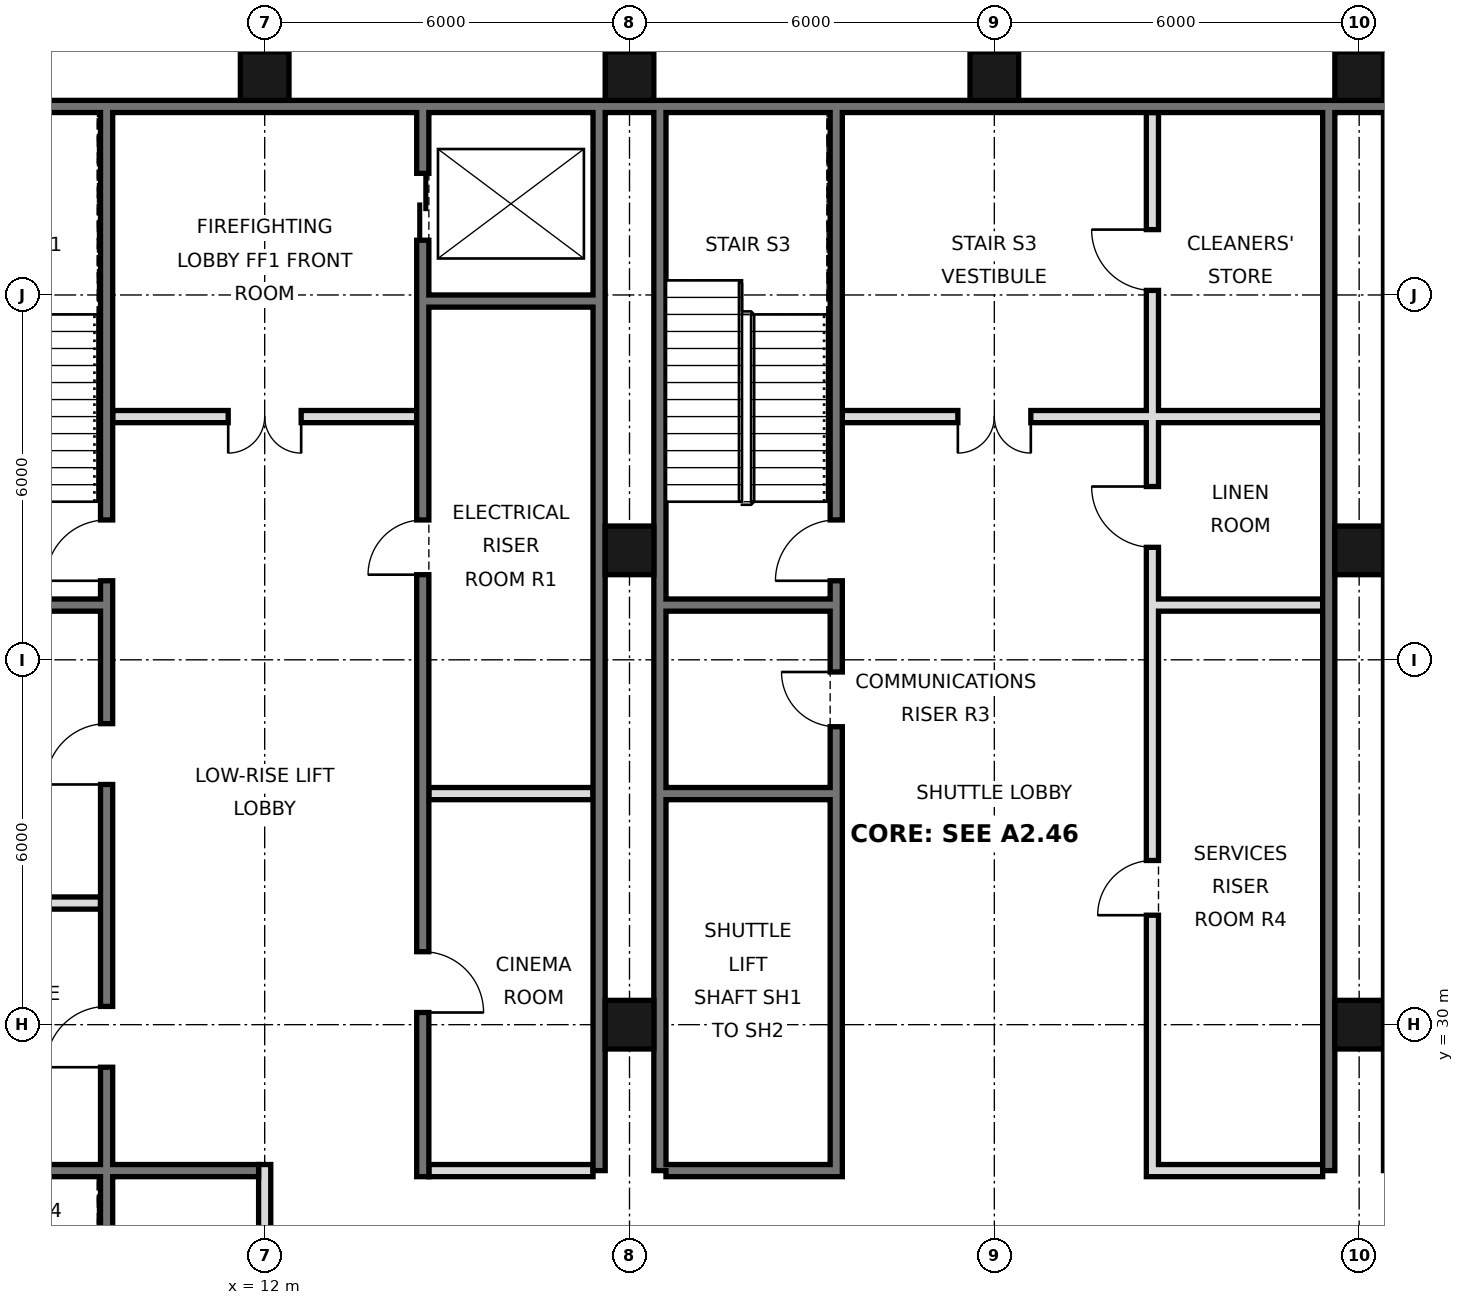
"""IFC4 building model, lengths in metres.
Left out: names, types, materials, properties, quantities, classifications, styles, units other than length and angle.
Written with IfcOpenShell. Run it as: python <this file> out.ifc"""

import sys

from ifc_helpers import new_model, si_unit, direction, frame, frame_2d, origin, origin_2d, place, context, subcontext, project, spatial, rectangle, hollow_rectangle, extrude, element, fill, save


model = new_model("IFC4")
c1 = context("Model", 3, precision=1e-05, world=origin(), true_north=direction((0.0, 1.0)))
c2 = subcontext(c1, "Body", "Model", "MODEL_VIEW")
j1 = project(units=[si_unit("LENGTHUNIT", "METRE"), si_unit("PLANEANGLEUNIT", "RADIAN")], contexts=[c1])
p1 = place(None, origin())
s1 = spatial("IfcSite", under=j1, at=p1, CompositionType="ELEMENT")
p2 = place(p1, origin())
s2 = spatial("IfcBuilding", under=s1, at=p2, CompositionType="ELEMENT")
p3 = place(p2, frame((0.0, 0.0, 181.6)))
s3 = spatial("IfcBuildingStorey", under=s2, at=p3, CompositionType="ELEMENT", Elevation=181.6)
for number, where, z_axis, x_axis in (
    (1, (12.0, 45.6, 0.0), (0.0, 0.0, 1.0), (1.0, 0.0, 0.0)),
    (2, (18.0, 30.0, 0.0), (0.0, 0.0, 1.0), (1.0, 0.0, 0.0)),
    (3, (18.0, 37.8, 0.0), (0.0, 0.0, 1.0), (1.0, 0.0, 0.0)),
    (4, (18.0, 45.6, 0.0), (0.0, 0.0, 1.0), (1.0, 0.0, 0.0)),
    (5, (24.0, 45.6, 0.0), (0.0, 0.0, 1.0), (1.0, 0.0, 0.0)),
    (6, (30.0, 30.0, 0.0), (0.0, 0.0, 1.0), (1.0, 0.0, 0.0)),
    (7, (30.0, 37.8, 0.0), (0.0, 0.0, 1.0), (1.0, 0.0, 0.0)),
    (8, (30.0, 45.6, 0.0), (0.0, 0.0, 1.0), (1.0, 0.0, 0.0)),
):
    element("IfcColumn", number, at=place(p3, frame(where, z_axis=z_axis, x_axis=x_axis)), inside=s3, PredefinedType="COLUMN", context=c2, shape_type="SweptSolid", body=[
        extrude(hollow_rectangle(XDim=0.8, YDim=0.8, WallThickness=0.045, at=origin_2d()), origin(), (0.0, 0.0, 1.0), 4.4),
    ])
p4 = place(p3, frame((6.6, 45.1, 0.0), z_axis=(0.0, 0.0, 1.0), x_axis=(1.0, 0.0, 0.0)))
e9 = element("IfcWall", 9, at=p4, inside=s3, PredefinedType="SOLIDWALL", context=c2, shape_type="SweptSolid", body=[
    extrude(rectangle(XDim=34.8, YDim=0.2, at=frame_2d((17.4, 0.0))), origin(), (0.0, 0.0, 1.0), 4.1),
])
for number, where, z_axis, x_axis in (
    (10, (17.5, 27.6, 0.0), (0.0, 0.0, 1.0), (0.0, 1.0, 0.0)),
    (11, (18.5, 27.6, 0.0), (0.0, 0.0, 1.0), (0.0, 1.0, 0.0)),
    (12, (29.5, 27.6, 0.0), (0.0, 0.0, 1.0), (0.0, 1.0, 0.0)),
):
    element("IfcWall", number, at=place(p3, frame(where, z_axis=z_axis, x_axis=x_axis)), inside=s3, PredefinedType="SOLIDWALL", context=c2, shape_type="SweptSolid", body=[
        extrude(rectangle(XDim=17.5, YDim=0.2, at=frame_2d((8.75, 0.0))), origin(), (0.0, 0.0, 1.0), 4.1),
    ])
p5 = place(p3, frame((12.0, 21.6, 0.0), z_axis=(0.0, 0.0, 1.0), x_axis=(0.0, 1.0, 0.0)))
e13 = element("IfcWall", 13, at=p5, inside=s3, PredefinedType="PARTITIONING", context=c2, shape_type="SweptSolid", body=[
    extrude(rectangle(XDim=6.1, YDim=0.2, at=frame_2d((3.05, 0.0))), origin(), (0.0, 0.0, 1.0), 4.1),
])
p6 = place(p3, frame((14.6, 27.5, 0.0), z_axis=(0.0, 0.0, 1.0), x_axis=(0.0, 1.0, 0.0)))
e14 = element("IfcWall", 14, at=p6, inside=s3, PredefinedType="SOLIDWALL", context=c2, shape_type="SweptSolid", body=[
    extrude(rectangle(XDim=17.5, YDim=0.2, at=frame_2d((8.75, 0.0))), origin(), (0.0, 0.0, 1.0), 4.1),
])
p7 = place(p6, frame((15.4, 0.0, 0.0)))
e15 = element("IfcOpeningElement", 15, at=p7, cuts=e14, PredefinedType="OPENING", context=c2, shape_type="SweptSolid", body=[
    extrude(rectangle(XDim=1.1, YDim=2.1, at=frame_2d((0.55, 1.05))), frame((0.0, 0.11, 0.0), z_axis=(0.0, -1.0, 0.0), x_axis=(1.0, 0.0, 0.0)), (0.0, 0.0, 1.0), 0.22),
])
p8 = place(p6, frame((2.7, 0.0, 0.0)))
e16 = element("IfcOpeningElement", 16, at=p8, cuts=e14, PredefinedType="OPENING", context=c2, shape_type="SweptSolid", body=[
    extrude(rectangle(XDim=1.0, YDim=2.1, at=frame_2d((0.5, 1.05))), frame((0.0, 0.11, 0.0), z_axis=(0.0, -1.0, 0.0), x_axis=(1.0, 0.0, 0.0)), (0.0, 0.0, 1.0), 0.22),
])
p9 = place(p6, frame((9.9, 0.0, 0.0)))
e17 = element("IfcOpeningElement", 17, at=p9, cuts=e14, PredefinedType="OPENING", context=c2, shape_type="SweptSolid", body=[
    extrude(rectangle(XDim=0.9, YDim=2.1, at=frame_2d((0.45, 1.05))), frame((0.0, 0.11, 0.0), z_axis=(0.0, -1.0, 0.0), x_axis=(1.0, 0.0, 0.0)), (0.0, 0.0, 1.0), 0.22),
])
p10 = place(p3, frame((21.4, 27.5, 0.0), z_axis=(0.0, 0.0, 1.0), x_axis=(0.0, 1.0, 0.0)))
e18 = element("IfcWall", 18, at=p10, inside=s3, PredefinedType="SOLIDWALL", context=c2, shape_type="SweptSolid", body=[
    extrude(rectangle(XDim=17.5, YDim=0.2, at=frame_2d((8.75, 0.0))), origin(), (0.0, 0.0, 1.0), 4.1),
])
p11 = place(p10, frame((9.8, 0.0, 0.0)))
e19 = element("IfcOpeningElement", 19, at=p11, cuts=e18, PredefinedType="OPENING", context=c2, shape_type="SweptSolid", body=[
    extrude(rectangle(XDim=1.0, YDim=2.1, at=frame_2d((0.5, 1.05))), frame((0.0, 0.11, 0.0), z_axis=(0.0, -1.0, 0.0), x_axis=(1.0, 0.0, 0.0)), (0.0, 0.0, 1.0), 0.22),
])
p12 = place(p10, frame((7.4, 0.0, 0.0)))
e20 = element("IfcOpeningElement", 20, at=p12, cuts=e18, PredefinedType="OPENING", context=c2, shape_type="SweptSolid", body=[
    extrude(rectangle(XDim=0.9, YDim=2.1, at=frame_2d((0.45, 1.05))), frame((0.0, 0.11, 0.0), z_axis=(0.0, -1.0, 0.0), x_axis=(1.0, 0.0, 0.0)), (0.0, 0.0, 1.0), 0.22),
])
p13 = place(p3, frame((26.6, 27.5, 0.0), z_axis=(0.0, 0.0, 1.0), x_axis=(0.0, 1.0, 0.0)))
e21 = element("IfcWall", 21, at=p13, inside=s3, PredefinedType="SOLIDWALL", context=c2, shape_type="SweptSolid", body=[
    extrude(rectangle(XDim=17.5, YDim=0.2, at=frame_2d((8.75, 0.0))), origin(), (0.0, 0.0, 1.0), 4.1),
])
p14 = place(p13, frame((4.3, 0.0, 0.0)))
e22 = element("IfcOpeningElement", 22, at=p14, cuts=e21, PredefinedType="OPENING", context=c2, shape_type="SweptSolid", body=[
    extrude(rectangle(XDim=0.9, YDim=2.1, at=frame_2d((0.45, 1.05))), frame((0.0, 0.11, 0.0), z_axis=(0.0, -1.0, 0.0), x_axis=(1.0, 0.0, 0.0)), (0.0, 0.0, 1.0), 0.22),
])
p15 = place(p13, frame((10.35, 0.0, 0.0)))
e23 = element("IfcOpeningElement", 23, at=p15, cuts=e21, PredefinedType="OPENING", context=c2, shape_type="SweptSolid", body=[
    extrude(rectangle(XDim=1.0, YDim=2.1, at=frame_2d((0.5, 1.05))), frame((0.0, 0.11, 0.0), z_axis=(0.0, -1.0, 0.0), x_axis=(1.0, 0.0, 0.0)), (0.0, 0.0, 1.0), 0.22),
])
p16 = place(p13, frame((14.575, 0.0, 0.0)))
e24 = element("IfcOpeningElement", 24, at=p16, cuts=e21, PredefinedType="OPENING", context=c2, shape_type="SweptSolid", body=[
    extrude(rectangle(XDim=1.0, YDim=2.1, at=frame_2d((0.5, 1.05))), frame((0.0, 0.11, 0.0), z_axis=(0.0, -1.0, 0.0), x_axis=(1.0, 0.0, 0.0)), (0.0, 0.0, 1.0), 0.22),
])
p17 = place(p3, frame((9.4, 21.6, 0.0), z_axis=(0.0, 0.0, 1.0), x_axis=(0.0, 1.0, 0.0)))
e25 = element("IfcWall", 25, at=p17, inside=s3, PredefinedType="SOLIDWALL", context=c2, shape_type="SweptSolid", body=[
    extrude(rectangle(XDim=23.4, YDim=0.2, at=frame_2d((11.7, 0.0))), origin(), (0.0, 0.0, 1.0), 4.1),
])
p18 = place(p17, frame((7.7, 0.0, 0.0)))
e26 = element("IfcOpeningElement", 26, at=p18, cuts=e25, PredefinedType="OPENING", context=c2, shape_type="SweptSolid", body=[
    extrude(rectangle(XDim=1.0, YDim=2.1, at=frame_2d((0.5, 1.05))), frame((0.0, 0.11, 0.0), z_axis=(0.0, -1.0, 0.0), x_axis=(1.0, 0.0, 0.0)), (0.0, 0.0, 1.0), 0.22),
])
p19 = place(p17, frame((12.35, 0.0, 0.0)))
e27 = element("IfcOpeningElement", 27, at=p19, cuts=e25, PredefinedType="OPENING", context=c2, shape_type="SweptSolid", body=[
    extrude(rectangle(XDim=1.0, YDim=2.1, at=frame_2d((0.5, 1.05))), frame((0.0, 0.11, 0.0), z_axis=(0.0, -1.0, 0.0), x_axis=(1.0, 0.0, 0.0)), (0.0, 0.0, 1.0), 0.22),
])
p20 = place(p17, frame((15.7, 0.0, 0.0)))
e28 = element("IfcOpeningElement", 28, at=p20, cuts=e25, PredefinedType="OPENING", context=c2, shape_type="SweptSolid", body=[
    extrude(rectangle(XDim=1.0, YDim=2.1, at=frame_2d((0.5, 1.05))), frame((0.0, 0.11, 0.0), z_axis=(0.0, -1.0, 0.0), x_axis=(1.0, 0.0, 0.0)), (0.0, 0.0, 1.0), 0.22),
])
p21 = place(p17, frame((0.175, 0.0, 0.0)))
e29 = element("IfcOpeningElement", 29, at=p21, cuts=e25, PredefinedType="OPENING", context=c2, shape_type="SweptSolid", body=[
    extrude(rectangle(XDim=0.9, YDim=2.1, at=frame_2d((0.45, 1.05))), frame((0.0, 0.11, 0.0), z_axis=(0.0, -1.0, 0.0), x_axis=(1.0, 0.0, 0.0)), (0.0, 0.0, 1.0), 0.22),
])
p22 = place(p3, frame((14.7, 27.6, 0.0), z_axis=(0.0, 0.0, 1.0), x_axis=(1.0, 0.0, 0.0)))
e30 = element("IfcWall", 30, at=p22, inside=s3, PredefinedType="PARTITIONING", context=c2, shape_type="SweptSolid", body=[
    extrude(rectangle(XDim=2.7, YDim=0.2, at=frame_2d((1.35, 0.0))), origin(), (0.0, 0.0, 1.0), 4.1),
])
for number, where, z_axis, x_axis in (
    (31, (18.6, 27.6, 0.0), (0.0, 0.0, 1.0), (1.0, 0.0, 0.0)),
    (32, (26.7, 27.6, 0.0), (0.0, 0.0, 1.0), (1.0, 0.0, 0.0)),
):
    element("IfcWall", number, at=place(p3, frame(where, z_axis=z_axis, x_axis=x_axis)), inside=s3, PredefinedType="SOLIDWALL", context=c2, shape_type="SweptSolid", body=[
        extrude(rectangle(XDim=2.7, YDim=0.2, at=frame_2d((1.35, 0.0))), origin(), (0.0, 0.0, 1.0), 4.1),
    ])
p23 = place(p3, frame((6.6, 27.6, 0.0), z_axis=(0.0, 0.0, 1.0), x_axis=(1.0, 0.0, 0.0)))
e33 = element("IfcWall", 33, at=p23, inside=s3, PredefinedType="SOLIDWALL", context=c2, shape_type="SweptSolid", body=[
    extrude(rectangle(XDim=5.3, YDim=0.2, at=frame_2d((2.65, 0.0))), origin(), (0.0, 0.0, 1.0), 4.1),
])
p24 = place(p3, frame((6.6, 32.0, 0.0), z_axis=(0.0, 0.0, 1.0), x_axis=(1.0, 0.0, 0.0)))
e34 = element("IfcWall", 34, at=p24, inside=s3, PredefinedType="PARTITIONING", context=c2, shape_type="SweptSolid", body=[
    extrude(rectangle(XDim=2.7, YDim=0.2, at=frame_2d((1.35, 0.0))), origin(), (0.0, 0.0, 1.0), 4.1),
])
for number, where, z_axis, x_axis in (
    (35, (14.7, 33.8, 0.0), (0.0, 0.0, 1.0), (1.0, 0.0, 0.0)),
    (36, (18.6, 33.8, 0.0), (0.0, 0.0, 1.0), (1.0, 0.0, 0.0)),
    (37, (18.6, 36.9, 0.0), (0.0, 0.0, 1.0), (1.0, 0.0, 0.0)),
    (38, (26.7, 36.9, 0.0), (0.0, 0.0, 1.0), (1.0, 0.0, 0.0)),
    (39, (6.6, 36.9, 0.0), (0.0, 0.0, 1.0), (1.0, 0.0, 0.0)),
):
    element("IfcWall", number, at=place(p3, frame(where, z_axis=z_axis, x_axis=x_axis)), inside=s3, PredefinedType="SOLIDWALL", context=c2, shape_type="SweptSolid", body=[
        extrude(rectangle(XDim=2.7, YDim=0.2, at=frame_2d((1.35, 0.0))), origin(), (0.0, 0.0, 1.0), 4.1),
    ])
p25 = place(p3, frame((21.5, 40.0, 0.0), z_axis=(0.0, 0.0, 1.0), x_axis=(1.0, 0.0, 0.0)))
e40 = element("IfcWall", 40, at=p25, inside=s3, PredefinedType="PARTITIONING", context=c2, shape_type="SweptSolid", body=[
    extrude(rectangle(XDim=7.9, YDim=0.2, at=frame_2d((3.95, 0.0))), origin(), (0.0, 0.0, 1.0), 4.1),
])
p26 = place(p25, frame((1.9, 0.0, 0.0)))
e41 = element("IfcOpeningElement", 41, at=p26, cuts=e40, PredefinedType="OPENING", context=c2, shape_type="SweptSolid", body=[
    extrude(rectangle(XDim=1.2, YDim=2.1, at=frame_2d((0.6, 1.05))), frame((0.0, 0.11, 0.0), z_axis=(0.0, -1.0, 0.0), x_axis=(1.0, 0.0, 0.0)), (0.0, 0.0, 1.0), 0.22),
])
p27 = place(p3, frame((9.5, 40.0, 0.0), z_axis=(0.0, 0.0, 1.0), x_axis=(1.0, 0.0, 0.0)))
e42 = element("IfcWall", 42, at=p27, inside=s3, PredefinedType="PARTITIONING", context=c2, shape_type="SweptSolid", body=[
    extrude(rectangle(XDim=5.0, YDim=0.2, at=frame_2d((2.5, 0.0))), origin(), (0.0, 0.0, 1.0), 4.1),
])
p28 = place(p27, frame((1.9, 0.0, 0.0)))
e43 = element("IfcOpeningElement", 43, at=p28, cuts=e42, PredefinedType="OPENING", context=c2, shape_type="SweptSolid", body=[
    extrude(rectangle(XDim=1.2, YDim=2.1, at=frame_2d((0.6, 1.05))), frame((0.0, 0.11, 0.0), z_axis=(0.0, -1.0, 0.0), x_axis=(1.0, 0.0, 0.0)), (0.0, 0.0, 1.0), 0.22),
])
p29 = place(p3, frame((14.7, 41.9, 0.0), z_axis=(0.0, 0.0, 1.0), x_axis=(1.0, 0.0, 0.0)))
e44 = element("IfcWall", 44, at=p29, inside=s3, PredefinedType="SOLIDWALL", context=c2, shape_type="SweptSolid", body=[
    extrude(rectangle(XDim=2.7, YDim=0.2, at=frame_2d((1.35, 0.0))), origin(), (0.0, 0.0, 1.0), 4.1),
])
p30 = place(p28, frame((1.2, 0.0, 0.0), z_axis=(0.0, 0.0, 1.0), x_axis=(-1.0, 0.0, 0.0)))
e45 = element("IfcDoor", 45, at=p30, inside=s3, OperationType="DOUBLE_DOOR_SINGLE_SWING", PredefinedType="DOOR", context=c2, shape_type="SweptSolid", body=[
    extrude(rectangle(XDim=1.2, YDim=2.1, at=frame_2d((0.6, 1.05))), frame((0.0, 0.025, 0.0), z_axis=(0.0, -1.0, 0.0), x_axis=(1.0, 0.0, 0.0)), (0.0, 0.0, 1.0), 0.05),
])
fill(e43, e45)
p31 = place(p26, frame((1.2, 0.0, 0.0), z_axis=(0.0, 0.0, 1.0), x_axis=(-1.0, 0.0, 0.0)))
e46 = element("IfcDoor", 46, at=p31, inside=s3, OperationType="DOUBLE_DOOR_SINGLE_SWING", PredefinedType="DOOR", context=c2, shape_type="SweptSolid", body=[
    extrude(rectangle(XDim=1.2, YDim=2.1, at=frame_2d((0.6, 1.05))), frame((0.0, 0.025, 0.0), z_axis=(0.0, -1.0, 0.0), x_axis=(1.0, 0.0, 0.0)), (0.0, 0.0, 1.0), 0.05),
])
fill(e41, e46)
p32 = place(p7, origin())
e47 = element("IfcDoor", 47, at=p32, inside=s3, OperationType="DOUBLE_DOOR_SLIDING", PredefinedType="DOOR", context=c2, shape_type="SweptSolid", body=[
    extrude(rectangle(XDim=1.1, YDim=2.1, at=frame_2d((0.55, 1.05))), frame((0.0, 0.025, 0.0), z_axis=(0.0, -1.0, 0.0), x_axis=(1.0, 0.0, 0.0)), (0.0, 0.0, 1.0), 0.05),
])
fill(e15, e47)
p33 = place(p8, frame((1.0, 0.0, 0.0), z_axis=(0.0, 0.0, 1.0), x_axis=(-1.0, 0.0, 0.0)))
e48 = element("IfcDoor", 48, at=p33, inside=s3, OperationType="SINGLE_SWING_RIGHT", PredefinedType="DOOR", context=c2, shape_type="SweptSolid", body=[
    extrude(rectangle(XDim=1.0, YDim=2.1, at=frame_2d((0.5, 1.05))), frame((0.0, 0.025, 0.0), z_axis=(0.0, -1.0, 0.0), x_axis=(1.0, 0.0, 0.0)), (0.0, 0.0, 1.0), 0.05),
])
fill(e16, e48)
p34 = place(p18, origin())
e49 = element("IfcDoor", 49, at=p34, inside=s3, OperationType="SINGLE_SWING_LEFT", PredefinedType="DOOR", context=c2, shape_type="SweptSolid", body=[
    extrude(rectangle(XDim=1.0, YDim=2.1, at=frame_2d((0.5, 1.05))), frame((0.0, 0.025, 0.0), z_axis=(0.0, -1.0, 0.0), x_axis=(1.0, 0.0, 0.0)), (0.0, 0.0, 1.0), 0.05),
])
fill(e26, e49)
p35 = place(p19, origin())
e50 = element("IfcDoor", 50, at=p35, inside=s3, OperationType="SINGLE_SWING_LEFT", PredefinedType="DOOR", context=c2, shape_type="SweptSolid", body=[
    extrude(rectangle(XDim=1.0, YDim=2.1, at=frame_2d((0.5, 1.05))), frame((0.0, 0.025, 0.0), z_axis=(0.0, -1.0, 0.0), x_axis=(1.0, 0.0, 0.0)), (0.0, 0.0, 1.0), 0.05),
])
fill(e27, e50)
p36 = place(p20, origin())
e51 = element("IfcDoor", 51, at=p36, inside=s3, OperationType="SINGLE_SWING_LEFT", PredefinedType="DOOR", context=c2, shape_type="SweptSolid", body=[
    extrude(rectangle(XDim=1.0, YDim=2.1, at=frame_2d((0.5, 1.05))), frame((0.0, 0.025, 0.0), z_axis=(0.0, -1.0, 0.0), x_axis=(1.0, 0.0, 0.0)), (0.0, 0.0, 1.0), 0.05),
])
fill(e28, e51)
p37 = place(p11, origin())
e52 = element("IfcDoor", 52, at=p37, inside=s3, OperationType="SINGLE_SWING_LEFT", PredefinedType="DOOR", context=c2, shape_type="SweptSolid", body=[
    extrude(rectangle(XDim=1.0, YDim=2.1, at=frame_2d((0.5, 1.05))), frame((0.0, 0.025, 0.0), z_axis=(0.0, -1.0, 0.0), x_axis=(1.0, 0.0, 0.0)), (0.0, 0.0, 1.0), 0.05),
])
fill(e19, e52)
p38 = place(p9, origin())
e53 = element("IfcDoor", 53, at=p38, inside=s3, OperationType="SINGLE_SWING_LEFT", PredefinedType="DOOR", context=c2, shape_type="SweptSolid", body=[
    extrude(rectangle(XDim=0.9, YDim=2.1, at=frame_2d((0.45, 1.05))), frame((0.0, 0.025, 0.0), z_axis=(0.0, -1.0, 0.0), x_axis=(1.0, 0.0, 0.0)), (0.0, 0.0, 1.0), 0.05),
])
fill(e17, e53)
p39 = place(p12, frame((0.9, 0.0, 0.0), z_axis=(0.0, 0.0, 1.0), x_axis=(-1.0, 0.0, 0.0)))
e54 = element("IfcDoor", 54, at=p39, inside=s3, OperationType="SINGLE_SWING_LEFT", PredefinedType="DOOR", context=c2, shape_type="SweptSolid", body=[
    extrude(rectangle(XDim=0.9, YDim=2.1, at=frame_2d((0.45, 1.05))), frame((0.0, 0.025, 0.0), z_axis=(0.0, -1.0, 0.0), x_axis=(1.0, 0.0, 0.0)), (0.0, 0.0, 1.0), 0.05),
])
fill(e20, e54)
p40 = place(p14, origin())
e55 = element("IfcDoor", 55, at=p40, inside=s3, OperationType="SINGLE_SWING_LEFT", PredefinedType="DOOR", context=c2, shape_type="SweptSolid", body=[
    extrude(rectangle(XDim=0.9, YDim=2.1, at=frame_2d((0.45, 1.05))), frame((0.0, 0.025, 0.0), z_axis=(0.0, -1.0, 0.0), x_axis=(1.0, 0.0, 0.0)), (0.0, 0.0, 1.0), 0.05),
])
fill(e22, e55)
p41 = place(p15, frame((1.0, 0.0, 0.0), z_axis=(0.0, 0.0, 1.0), x_axis=(-1.0, 0.0, 0.0)))
e56 = element("IfcDoor", 56, at=p41, inside=s3, OperationType="SINGLE_SWING_LEFT", PredefinedType="DOOR", context=c2, shape_type="SweptSolid", body=[
    extrude(rectangle(XDim=1.0, YDim=2.1, at=frame_2d((0.5, 1.05))), frame((0.0, 0.025, 0.0), z_axis=(0.0, -1.0, 0.0), x_axis=(1.0, 0.0, 0.0)), (0.0, 0.0, 1.0), 0.05),
])
fill(e23, e56)
p42 = place(p16, frame((1.0, 0.0, 0.0), z_axis=(0.0, 0.0, 1.0), x_axis=(-1.0, 0.0, 0.0)))
e57 = element("IfcDoor", 57, at=p42, inside=s3, OperationType="SINGLE_SWING_LEFT", PredefinedType="DOOR", context=c2, shape_type="SweptSolid", body=[
    extrude(rectangle(XDim=1.0, YDim=2.1, at=frame_2d((0.5, 1.05))), frame((0.0, 0.025, 0.0), z_axis=(0.0, -1.0, 0.0), x_axis=(1.0, 0.0, 0.0)), (0.0, 0.0, 1.0), 0.05),
])
fill(e24, e57)
save(model, sys.argv[1])
